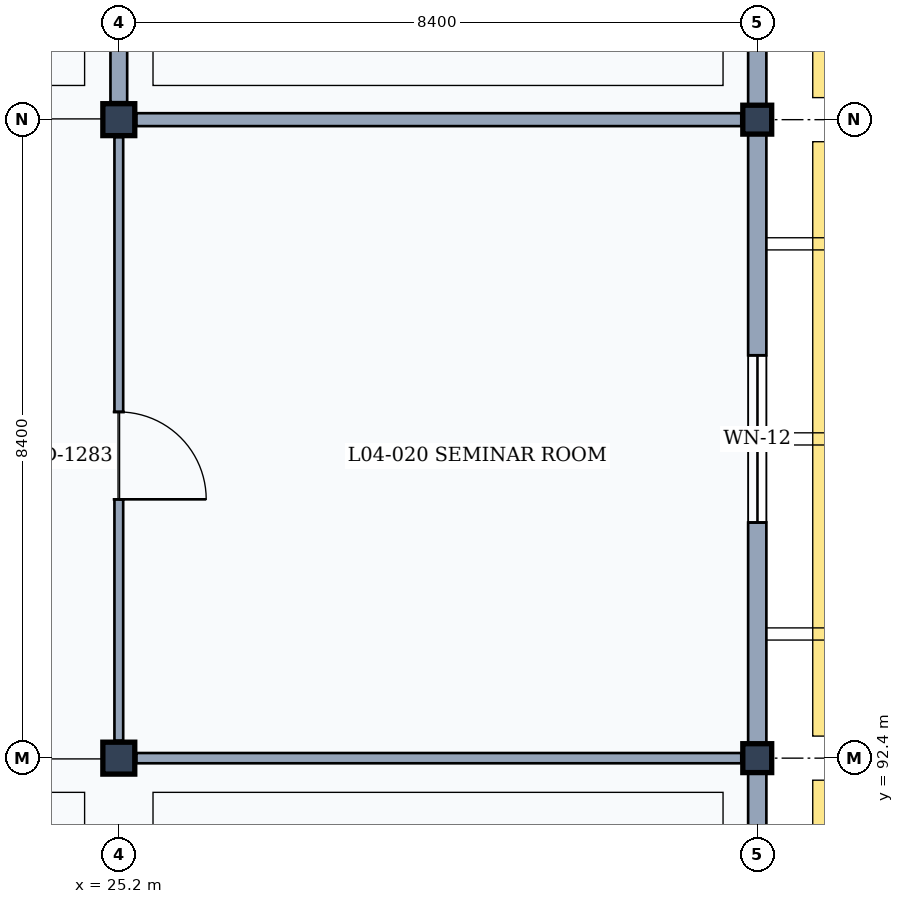
"""IFC4 building model, lengths in metres.
Left out: names, types, materials, properties, quantities, classifications, styles, units other than length and angle.
Written with IfcOpenShell. Run it as: python <this file> out.ifc"""

import sys

from ifc_helpers import new_model, si_unit, direction, frame, frame_2d, origin, origin_2d, place, context, subcontext, project, spatial, rectangle, extrude, element, fill, save


model = new_model("IFC4")
c1 = context("Model", 3, precision=1e-05, world=origin(), true_north=direction((0.0, 1.0)))
c2 = subcontext(c1, "Body", "Model", "MODEL_VIEW")
j1 = project(units=[si_unit("LENGTHUNIT", "METRE"), si_unit("PLANEANGLEUNIT", "RADIAN")], contexts=[c1])
p1 = place(None, origin())
s1 = spatial("IfcSite", under=j1, at=p1, CompositionType="ELEMENT")
p2 = place(p1, origin())
s2 = spatial("IfcBuilding", under=s1, at=p2, CompositionType="ELEMENT")
p3 = place(p2, frame((0.0, 0.0, 18.0)))
s3 = spatial("IfcBuildingStorey", under=s2, at=p3, CompositionType="ELEMENT", Elevation=18.0)
for number, where, z_axis, x_axis in (
    (1, (25.2, 92.4, 0.0), (0.0, 0.0, 1.0), (1.0, 0.0, 0.0)),
    (2, (25.2, 100.8, 0.0), (0.0, 0.0, 1.0), (1.0, 0.0, 0.0)),
):
    element("IfcColumn", number, at=place(p3, frame(where, z_axis=z_axis, x_axis=x_axis)), inside=s3, PredefinedType="COLUMN", context=c2, shape_type="SweptSolid", body=[
        extrude(rectangle(XDim=0.42, YDim=0.42, at=origin_2d()), origin(), (0.0, 0.0, 1.0), 4.2),
    ])
for number, where, z_axis, x_axis in (
    (3, (33.6, 92.4, 0.0), (0.0, 0.0, 1.0), (1.0, 0.0, 0.0)),
    (4, (33.6, 100.8, 0.0), (0.0, 0.0, 1.0), (1.0, 0.0, 0.0)),
):
    element("IfcColumn", number, at=place(p3, frame(where, z_axis=z_axis, x_axis=x_axis)), inside=s3, PredefinedType="COLUMN", context=c2, shape_type="SweptSolid", body=[
        extrude(rectangle(XDim=0.38, YDim=0.38, at=origin_2d()), origin(), (0.0, 0.0, 1.0), 4.2),
    ])
p4 = place(p3, frame((33.6, 92.21, 0.0), z_axis=(0.0, 0.0, 1.0), x_axis=(0.0, -1.0, 0.0)))
e5 = element("IfcWall", 5, at=p4, inside=s3, PredefinedType="SOLIDWALL", context=c2, shape_type="SweptSolid", body=[
    extrude(rectangle(XDim=8.02, YDim=0.24, at=frame_2d((4.01, 0.0))), origin(), (0.0, 0.0, 1.0), 3.36),
])
p5 = place(p4, frame((3.36, 0.0, 0.9)))
e6 = element("IfcOpeningElement", 6, at=p5, cuts=e5, PredefinedType="OPENING", context=c2, shape_type="SweptSolid", body=[
    extrude(rectangle(XDim=1.3, YDim=1.75, at=frame_2d((0.65, 0.875))), frame((0.0, 0.13, 0.0), z_axis=(0.0, -1.0, 0.0), x_axis=(1.0, 0.0, 0.0)), (0.0, 0.0, 1.0), 0.26),
])
p6 = place(p3, frame((33.6, 100.61, 0.0), z_axis=(0.0, 0.0, 1.0), x_axis=(0.0, -1.0, 0.0)))
e7 = element("IfcWall", 7, at=p6, inside=s3, PredefinedType="SOLIDWALL", context=c2, shape_type="SweptSolid", body=[
    extrude(rectangle(XDim=8.02, YDim=0.24, at=frame_2d((4.01, 0.0))), origin(), (0.0, 0.0, 1.0), 3.36),
])
p7 = place(p6, frame((2.91, 0.0, 0.9)))
e8 = element("IfcOpeningElement", 8, at=p7, cuts=e7, PredefinedType="OPENING", context=c2, shape_type="SweptSolid", body=[
    extrude(rectangle(XDim=2.2, YDim=1.9, at=frame_2d((1.1, 0.95))), frame((0.0, 0.13, 0.0), z_axis=(0.0, -1.0, 0.0), x_axis=(1.0, 0.0, 0.0)), (0.0, 0.0, 1.0), 0.26),
])
p8 = place(p3, frame((33.6, 109.01, 0.0), z_axis=(0.0, 0.0, 1.0), x_axis=(0.0, -1.0, 0.0)))
e9 = element("IfcWall", 9, at=p8, inside=s3, PredefinedType="SOLIDWALL", context=c2, shape_type="SweptSolid", body=[
    extrude(rectangle(XDim=8.02, YDim=0.24, at=frame_2d((4.01, 0.0))), origin(), (0.0, 0.0, 1.0), 3.36),
])
p9 = place(p8, frame((3.46, 0.0, 0.9)))
e10 = element("IfcOpeningElement", 10, at=p9, cuts=e9, PredefinedType="OPENING", context=c2, shape_type="SweptSolid", body=[
    extrude(rectangle(XDim=1.1, YDim=1.95, at=frame_2d((0.55, 0.975))), frame((0.0, 0.13, 0.0), z_axis=(0.0, -1.0, 0.0), x_axis=(1.0, 0.0, 0.0)), (0.0, 0.0, 1.0), 0.26),
])
p10 = place(p3, frame((25.2, 92.63, 0.0), z_axis=(0.0, 0.0, 1.0), x_axis=(0.0, 1.0, 0.0)))
e11 = element("IfcWall", 11, at=p10, inside=s3, PredefinedType="PARTITIONING", context=c2, shape_type="SweptSolid", body=[
    extrude(rectangle(XDim=7.94, YDim=0.115, at=frame_2d((3.97, 0.0))), origin(), (0.0, 0.0, 1.0), 3.32),
])
p11 = place(p10, frame((3.175, 0.0, 0.0)))
e12 = element("IfcOpeningElement", 12, at=p11, cuts=e11, PredefinedType="OPENING", context=c2, shape_type="SweptSolid", body=[
    extrude(rectangle(XDim=1.15, YDim=2.25, at=frame_2d((0.575, 1.125))), frame((0.0, 0.067, 0.0), z_axis=(0.0, -1.0, 0.0), x_axis=(1.0, 0.0, 0.0)), (0.0, 0.0, 1.0), 0.135),
])
p12 = place(p3, frame((25.2, 101.03, 0.0), z_axis=(0.0, 0.0, 1.0), x_axis=(0.0, 1.0, 0.0)))
e13 = element("IfcWall", 13, at=p12, inside=s3, PredefinedType="PARTITIONING", context=c2, shape_type="SweptSolid", body=[
    extrude(rectangle(XDim=7.94, YDim=0.22, at=frame_2d((3.97, 0.0))), origin(), (0.0, 0.0, 1.0), 3.32),
])
p13 = place(p12, frame((3.1, 0.0, 0.0)))
e14 = element("IfcOpeningElement", 14, at=p13, cuts=e13, PredefinedType="OPENING", context=c2, shape_type="SweptSolid", body=[
    extrude(rectangle(XDim=1.3, YDim=2.2, at=frame_2d((0.65, 1.1))), frame((0.0, 0.12, 0.0), z_axis=(0.0, -1.0, 0.0), x_axis=(1.0, 0.0, 0.0)), (0.0, 0.0, 1.0), 0.24),
])
p14 = place(p3, frame((25.43, 92.4, 0.0), z_axis=(0.0, 0.0, 1.0), x_axis=(1.0, 0.0, 0.0)))
e15 = element("IfcWall", 15, at=p14, inside=s3, PredefinedType="PARTITIONING", context=c2, shape_type="SweptSolid", body=[
    extrude(rectangle(XDim=7.96, YDim=0.135, at=frame_2d((3.98, 0.0))), origin(), (0.0, 0.0, 1.0), 3.32),
])
p15 = place(p3, frame((25.43, 100.8, 0.0), z_axis=(0.0, 0.0, 1.0), x_axis=(1.0, 0.0, 0.0)))
e16 = element("IfcWall", 16, at=p15, inside=s3, PredefinedType="PARTITIONING", context=c2, shape_type="SweptSolid", body=[
    extrude(rectangle(XDim=7.96, YDim=0.17, at=frame_2d((3.98, 0.0))), origin(), (0.0, 0.0, 1.0), 3.32),
])
p16 = place(p7, origin())
e17 = element("IfcWindow", 17, at=p16, inside=s3, PartitioningType="SINGLE_PANEL", PredefinedType="WINDOW", context=c2, shape_type="SweptSolid", body=[
    extrude(rectangle(XDim=2.2, YDim=1.9, at=frame_2d((1.1, 0.95))), frame((0.0, 0.03, 0.0), z_axis=(0.0, -1.0, 0.0), x_axis=(1.0, 0.0, 0.0)), (0.0, 0.0, 1.0), 0.06),
])
fill(e8, e17)
p17 = place(p11, frame((1.15, 0.0, 0.0), z_axis=(0.0, 0.0, 1.0), x_axis=(-1.0, 0.0, 0.0)))
e18 = element("IfcDoor", 18, at=p17, inside=s3, OperationType="SINGLE_SWING_RIGHT", PredefinedType="DOOR", context=c2, shape_type="SweptSolid", body=[
    extrude(rectangle(XDim=1.15, YDim=2.25, at=frame_2d((0.575, 1.125))), frame((0.0, 0.025, 0.0), z_axis=(0.0, -1.0, 0.0), x_axis=(1.0, 0.0, 0.0)), (0.0, 0.0, 1.0), 0.05),
])
fill(e12, e18)
save(model, sys.argv[1])
